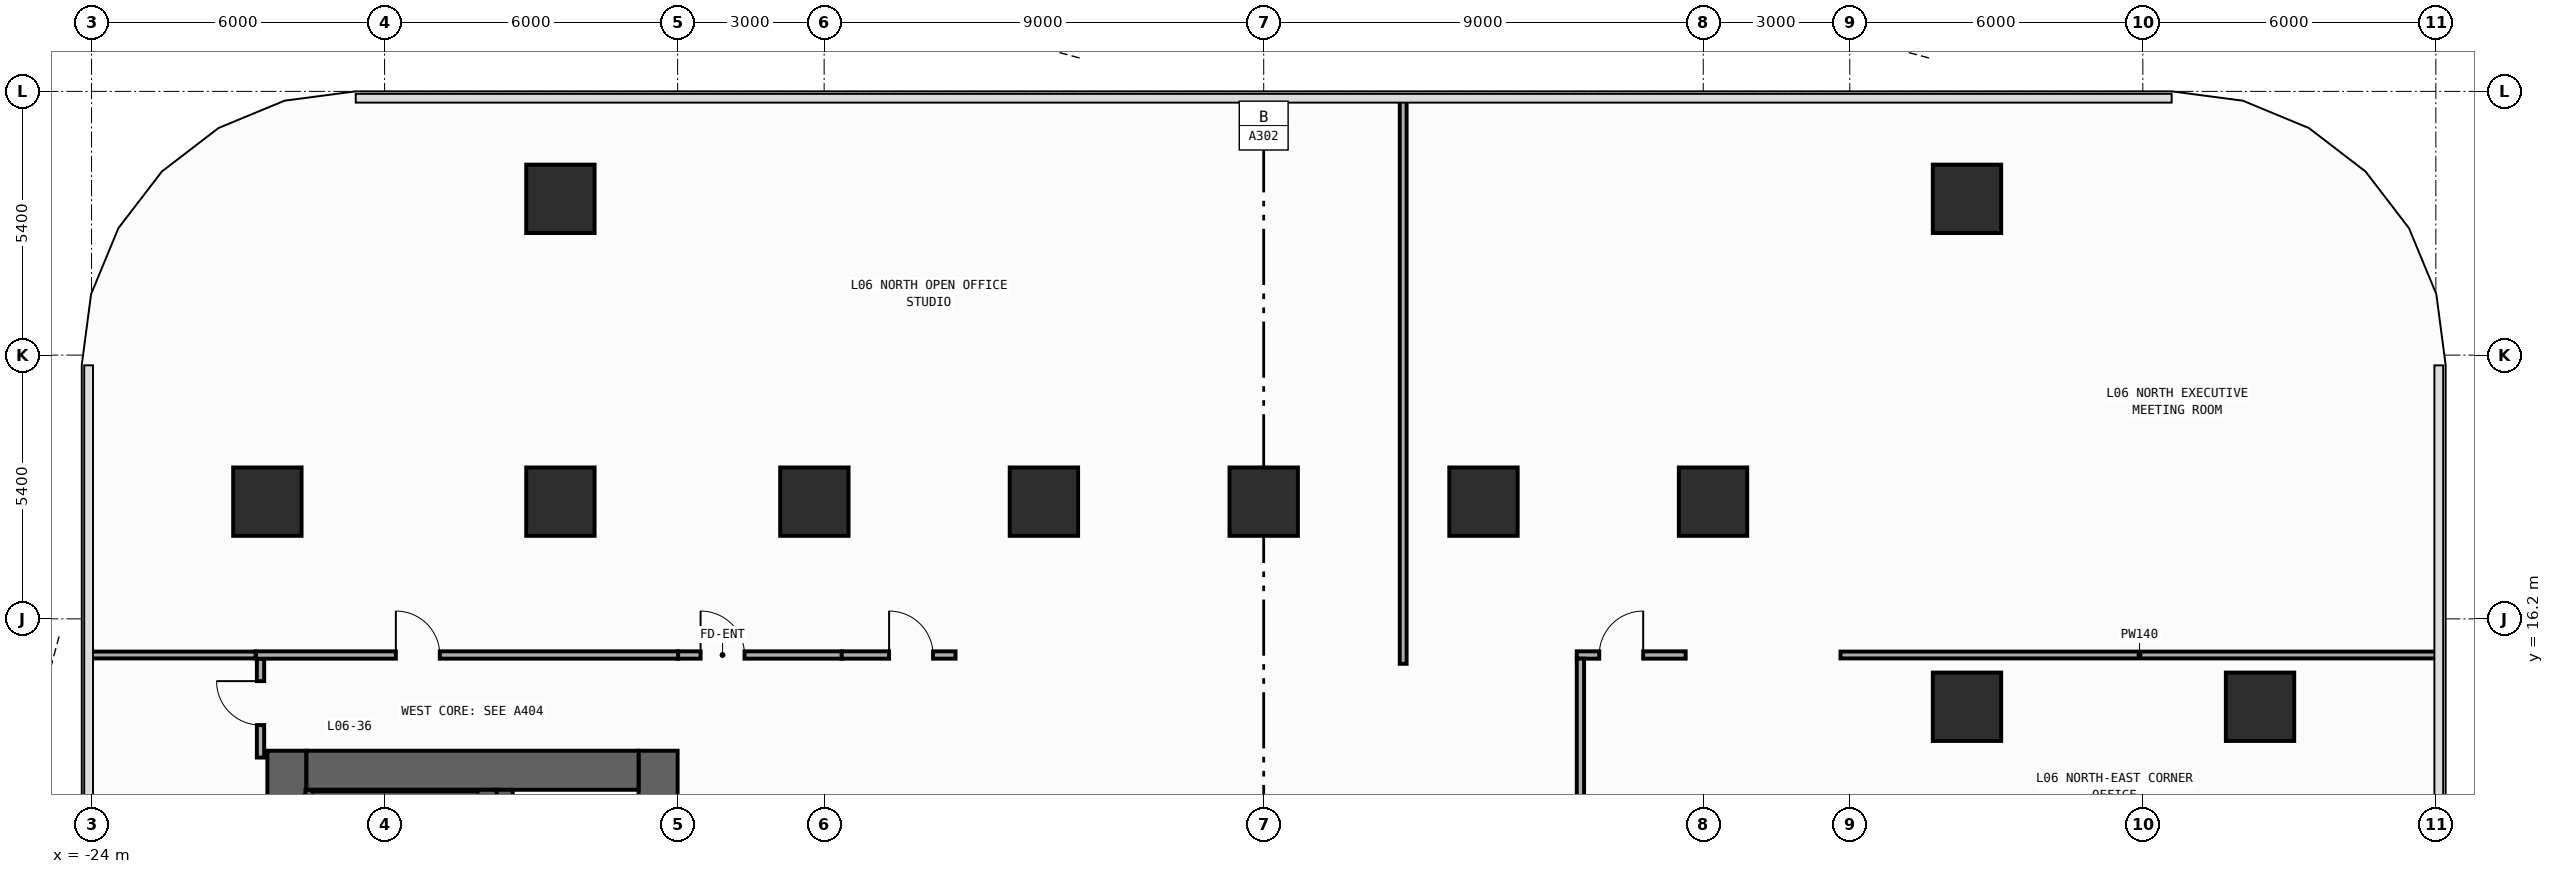
"""IFC4 building model, lengths in metres.
Left out: names, types, materials, properties, quantities, classifications, styles, units other than length and angle.
Written with IfcOpenShell. Run it as: python <this file> out.ifc"""

import sys

from ifc_helpers import new_model, si_unit, direction, frame, frame_2d, origin, origin_2d, place, context, subcontext, project, spatial, rectangle, extrude, element, fill, save


model = new_model("IFC4")
c1 = context("Model", 3, precision=1e-05, world=origin(), true_north=direction((0.0, 1.0)))
c2 = subcontext(c1, "Body", "Model", "MODEL_VIEW")
j1 = project(units=[si_unit("LENGTHUNIT", "METRE"), si_unit("PLANEANGLEUNIT", "RADIAN")], contexts=[c1])
p1 = place(None, origin())
s1 = spatial("IfcSite", under=j1, at=p1, CompositionType="ELEMENT")
p2 = place(p1, origin())
s2 = spatial("IfcBuilding", under=s1, at=p2, CompositionType="ELEMENT")
p3 = place(p2, frame((0.0, 0.0, 26.0)))
s3 = spatial("IfcBuildingStorey", under=s2, at=p3, CompositionType="ELEMENT", Elevation=26.0)
p4 = place(p3, frame((-20.0, -13.5, 0.0), z_axis=(0.0, 0.0, 1.0), x_axis=(0.0, 1.0, 0.0)))
e1 = element("IfcWall", 1, at=p4, inside=s3, PredefinedType="SHEAR", context=c2, shape_type="SweptSolid", body=[
    extrude(rectangle(XDim=27.0, YDim=0.8, at=frame_2d((13.5, 0.0))), origin(), (0.0, 0.0, 1.0), 3.94),
])
p5 = place(p3, frame((-12.4, -13.5, 0.0), z_axis=(0.0, 0.0, 1.0), x_axis=(0.0, 1.0, 0.0)))
e2 = element("IfcWall", 2, at=p5, inside=s3, PredefinedType="SHEAR", context=c2, shape_type="SweptSolid", body=[
    extrude(rectangle(XDim=27.0, YDim=0.8, at=frame_2d((13.5, 0.0))), origin(), (0.0, 0.0, 1.0), 3.94),
])
p6 = place(p5, frame((21.55, 0.0, 0.0)))
e3 = element("IfcOpeningElement", 3, at=p6, cuts=e2, PredefinedType="OPENING", context=c2, shape_type="SweptSolid", body=[
    extrude(rectangle(XDim=1.1, YDim=2.2, at=frame_2d((0.55, 1.1))), frame((0.0, 0.41, 0.0), z_axis=(0.0, -1.0, 0.0), x_axis=(1.0, 0.0, 0.0)), (0.0, 0.0, 1.0), 0.82),
])
p7 = place(p5, frame((18.35, 0.0, 0.0)))
e4 = element("IfcOpeningElement", 4, at=p7, cuts=e2, PredefinedType="OPENING", context=c2, shape_type="SweptSolid", body=[
    extrude(rectangle(XDim=1.1, YDim=2.2, at=frame_2d((0.55, 1.1))), frame((0.0, 0.41, 0.0), z_axis=(0.0, -1.0, 0.0), x_axis=(1.0, 0.0, 0.0)), (0.0, 0.0, 1.0), 0.82),
])
p8 = place(p5, frame((15.15, 0.0, 0.0)))
e5 = element("IfcOpeningElement", 5, at=p8, cuts=e2, PredefinedType="OPENING", context=c2, shape_type="SweptSolid", body=[
    extrude(rectangle(XDim=1.1, YDim=2.2, at=frame_2d((0.55, 1.1))), frame((0.0, 0.41, 0.0), z_axis=(0.0, -1.0, 0.0), x_axis=(1.0, 0.0, 0.0)), (0.0, 0.0, 1.0), 0.82),
])
p9 = place(p5, frame((10.35, 0.0, 0.0)))
e6 = element("IfcOpeningElement", 6, at=p9, cuts=e2, PredefinedType="OPENING", context=c2, shape_type="SweptSolid", body=[
    extrude(rectangle(XDim=1.1, YDim=2.2, at=frame_2d((0.55, 1.1))), frame((0.0, 0.41, 0.0), z_axis=(0.0, -1.0, 0.0), x_axis=(1.0, 0.0, 0.0)), (0.0, 0.0, 1.0), 0.82),
])
p10 = place(p5, frame((7.15, 0.0, 0.0)))
e7 = element("IfcOpeningElement", 7, at=p10, cuts=e2, PredefinedType="OPENING", context=c2, shape_type="SweptSolid", body=[
    extrude(rectangle(XDim=1.1, YDim=2.2, at=frame_2d((0.55, 1.1))), frame((0.0, 0.41, 0.0), z_axis=(0.0, -1.0, 0.0), x_axis=(1.0, 0.0, 0.0)), (0.0, 0.0, 1.0), 0.82),
])
p11 = place(p5, frame((3.95, 0.0, 0.0)))
e8 = element("IfcOpeningElement", 8, at=p11, cuts=e2, PredefinedType="OPENING", context=c2, shape_type="SweptSolid", body=[
    extrude(rectangle(XDim=1.1, YDim=2.2, at=frame_2d((0.55, 1.1))), frame((0.0, 0.41, 0.0), z_axis=(0.0, -1.0, 0.0), x_axis=(1.0, 0.0, 0.0)), (0.0, 0.0, 1.0), 0.82),
])
p12 = place(p5, frame((12.725, 0.0, 0.0)))
e9 = element("IfcOpeningElement", 9, at=p12, cuts=e2, PredefinedType="OPENING", context=c2, shape_type="SweptSolid", body=[
    extrude(rectangle(XDim=1.15, YDim=2.2, at=frame_2d((0.575, 1.1))), frame((0.0, 0.41, 0.0), z_axis=(0.0, -1.0, 0.0), x_axis=(1.0, 0.0, 0.0)), (0.0, 0.0, 1.0), 0.82),
])
p13 = place(p5, frame((1.625, 0.0, 0.0)))
e10 = element("IfcOpeningElement", 10, at=p13, cuts=e2, PredefinedType="OPENING", context=c2, shape_type="SweptSolid", body=[
    extrude(rectangle(XDim=0.85, YDim=2.1, at=frame_2d((0.425, 1.05))), frame((0.0, 0.41, 0.0), z_axis=(0.0, -1.0, 0.0), x_axis=(1.0, 0.0, 0.0)), (0.0, 0.0, 1.0), 0.82),
])
p14 = place(p3, frame((-19.6, 13.1, 0.0), z_axis=(0.0, 0.0, 1.0), x_axis=(1.0, 0.0, 0.0)))
e11 = element("IfcWall", 11, at=p14, inside=s3, PredefinedType="SHEAR", context=c2, shape_type="SweptSolid", body=[
    extrude(rectangle(XDim=6.8, YDim=0.8, at=frame_2d((3.4, 0.0))), origin(), (0.0, 0.0, 1.0), 3.94),
])
p15 = place(p3, frame((-15.55, -12.7, 0.0), z_axis=(0.0, 0.0, 1.0), x_axis=(0.0, 1.0, 0.0)))
e12 = element("IfcWall", 12, at=p15, inside=s3, PredefinedType="SHEAR", context=c2, shape_type="SweptSolid", body=[
    extrude(rectangle(XDim=25.4, YDim=0.35, at=frame_2d((12.7, 0.0))), origin(), (0.0, 0.0, 1.0), 3.94),
])
p16 = place(p15, frame((11.925, 0.0, 0.0)))
e13 = element("IfcOpeningElement", 13, at=p16, cuts=e12, PredefinedType="OPENING", context=c2, shape_type="SweptSolid", body=[
    extrude(rectangle(XDim=1.15, YDim=2.2, at=frame_2d((0.575, 1.1))), frame((0.0, 0.185, 0.0), z_axis=(0.0, -1.0, 0.0), x_axis=(1.0, 0.0, 0.0)), (0.0, 0.0, 1.0), 0.37),
])
p17 = place(p15, frame((0.825, 0.0, 0.0)))
e14 = element("IfcOpeningElement", 14, at=p17, cuts=e12, PredefinedType="OPENING", context=c2, shape_type="SweptSolid", body=[
    extrude(rectangle(XDim=0.85, YDim=2.1, at=frame_2d((0.425, 1.05))), frame((0.0, 0.185, 0.0), z_axis=(0.0, -1.0, 0.0), x_axis=(1.0, 0.0, 0.0)), (0.0, 0.0, 1.0), 0.37),
])
p18 = place(p3, frame((-19.62, 12.59, 0.0), z_axis=(0.0, 0.0, 1.0), x_axis=(1.0, 0.0, 0.0)))
e15 = element("IfcWall", 15, at=p18, inside=s3, PredefinedType="SHEAR", context=c2, shape_type="SweptSolid", body=[
    extrude(rectangle(XDim=3.915, YDim=0.22, at=frame_2d((1.958, 0.0))), origin(), (0.0, 0.0, 1.0), 3.94),
])
for number, where, z_axis, x_axis in (
    (16, (-9.2, 18.6, 0.0), (0.0, 0.0, 1.0), (1.0, 0.0, 0.0)),
    (17, (9.2, 18.6, 0.0), (0.0, 0.0, 1.0), (1.0, 0.0, 0.0)),
    (18, (-20.4, 18.6, 0.0), (0.0, 0.0, 1.0), (1.0, 0.0, 0.0)),
    (19, (20.4, 14.4, 0.0), (0.0, 0.0, 1.0), (1.0, 0.0, 0.0)),
    (20, (-14.4, 18.6, 0.0), (0.0, 0.0, 1.0), (1.0, 0.0, 0.0)),
    (21, (14.4, 14.4, 0.0), (0.0, 0.0, 1.0), (1.0, 0.0, 0.0)),
    (22, (-4.5, 18.6, 0.0), (0.0, 0.0, 1.0), (1.0, 0.0, 0.0)),
    (23, (0.0, 18.6, 0.0), (0.0, 0.0, 1.0), (1.0, 0.0, 0.0)),
    (24, (4.5, 18.6, 0.0), (0.0, 0.0, 1.0), (1.0, 0.0, 0.0)),
    (25, (-14.4, 24.8, 0.0), (0.0, 0.0, 1.0), (1.0, 0.0, 0.0)),
    (26, (14.4, 24.8, 0.0), (0.0, 0.0, 1.0), (1.0, 0.0, 0.0)),
):
    element("IfcColumn", number, at=place(p3, frame(where, z_axis=z_axis, x_axis=x_axis)), inside=s3, PredefinedType="COLUMN", context=c2, shape_type="SweptSolid", body=[
        extrude(rectangle(XDim=1.4, YDim=1.4, at=origin_2d()), origin(), (0.0, 0.0, 1.0), 4.2),
    ])
p19 = place(p3, frame((-11.99, 15.46, 0.0), z_axis=(0.0, 0.0, 1.0), x_axis=(1.0, 0.0, 0.0)))
e27 = element("IfcWall", 27, at=p19, inside=s3, PredefinedType="PARTITIONING", context=c2, shape_type="SweptSolid", body=[
    extrude(rectangle(XDim=3.35, YDim=0.15, at=frame_2d((1.675, 0.0))), origin(), (0.0, 0.0, 1.0), 3.94),
])
p20 = place(p19, frame((0.46, 0.0, 0.0)))
e28 = element("IfcOpeningElement", 28, at=p20, cuts=e27, PredefinedType="OPENING", context=c2, shape_type="SweptSolid", body=[
    extrude(rectangle(XDim=0.9, YDim=2.15, at=frame_2d((0.45, 1.075))), frame((0.0, 0.085, 0.0), z_axis=(0.0, -1.0, 0.0), x_axis=(1.0, 0.0, 0.0)), (0.0, 0.0, 1.0), 0.17),
])
p21 = place(p3, frame((-8.64, 15.46, 0.0), z_axis=(0.0, 0.0, 1.0), x_axis=(1.0, 0.0, 0.0)))
e29 = element("IfcWall", 29, at=p21, inside=s3, PredefinedType="PARTITIONING", context=c2, shape_type="SweptSolid", body=[
    extrude(rectangle(XDim=2.33, YDim=0.15, at=frame_2d((1.165, 0.0))), origin(), (0.0, 0.0, 1.0), 3.94),
])
p22 = place(p21, frame((0.97, 0.0, 0.0)))
e30 = element("IfcOpeningElement", 30, at=p22, cuts=e29, PredefinedType="OPENING", context=c2, shape_type="SweptSolid", body=[
    extrude(rectangle(XDim=0.9, YDim=2.15, at=frame_2d((0.45, 1.075))), frame((0.0, 0.085, 0.0), z_axis=(0.0, -1.0, 0.0), x_axis=(1.0, 0.0, 0.0)), (0.0, 0.0, 1.0), 0.17),
])
p23 = place(p3, frame((6.41, 15.46, 0.0), z_axis=(0.0, 0.0, 1.0), x_axis=(1.0, 0.0, 0.0)))
e31 = element("IfcWall", 31, at=p23, inside=s3, PredefinedType="PARTITIONING", context=c2, shape_type="SweptSolid", body=[
    extrude(rectangle(XDim=2.23, YDim=0.15, at=frame_2d((1.115, 0.0))), origin(), (0.0, 0.0, 1.0), 3.94),
])
p24 = place(p23, frame((0.46, 0.0, 0.0)))
e32 = element("IfcOpeningElement", 32, at=p24, cuts=e31, PredefinedType="OPENING", context=c2, shape_type="SweptSolid", body=[
    extrude(rectangle(XDim=0.9, YDim=2.15, at=frame_2d((0.45, 1.075))), frame((0.0, 0.085, 0.0), z_axis=(0.0, -1.0, 0.0), x_axis=(1.0, 0.0, 0.0)), (0.0, 0.0, 1.0), 0.17),
])
p25 = place(p3, frame((6.485, -3.02, 0.0), z_axis=(0.0, 0.0, 1.0), x_axis=(0.0, 1.0, 0.0)))
e33 = element("IfcWall", 33, at=p25, inside=s3, PredefinedType="PARTITIONING", context=c2, shape_type="SweptSolid", body=[
    extrude(rectangle(XDim=18.405, YDim=0.15, at=frame_2d((9.203, 0.0))), origin(), (0.0, 0.0, 1.0), 3.94),
])
p26 = place(p25, frame((7.944, 0.0, 0.0)))
e34 = element("IfcOpeningElement", 34, at=p26, cuts=e33, PredefinedType="OPENING", context=c2, shape_type="SweptSolid", body=[
    extrude(rectangle(XDim=0.9, YDim=2.15, at=frame_2d((0.45, 1.075))), frame((0.0, 0.085, 0.0), z_axis=(0.0, -1.0, 0.0), x_axis=(1.0, 0.0, 0.0)), (0.0, 0.0, 1.0), 0.17),
])
p27 = place(p3, frame((-20.54, 13.36, 0.0), z_axis=(0.0, 0.0, 1.0), x_axis=(0.0, 1.0, 0.0)))
e35 = element("IfcWall", 35, at=p27, inside=s3, PredefinedType="PARTITIONING", context=c2, shape_type="SweptSolid", body=[
    extrude(rectangle(XDim=2.025, YDim=0.15, at=frame_2d((1.012, 0.0))), origin(), (0.0, 0.0, 1.0), 3.94),
])
p28 = place(p27, frame((0.665, 0.0, 0.0)))
e36 = element("IfcOpeningElement", 36, at=p28, cuts=e35, PredefinedType="OPENING", context=c2, shape_type="SweptSolid", body=[
    extrude(rectangle(XDim=0.9, YDim=2.15, at=frame_2d((0.45, 1.075))), frame((0.0, 0.085, 0.0), z_axis=(0.0, -1.0, 0.0), x_axis=(1.0, 0.0, 0.0)), (0.0, 0.0, 1.0), 0.17),
])
p29 = place(p3, frame((-20.64, 15.46, 0.0), z_axis=(0.0, 0.0, 1.0), x_axis=(1.0, 0.0, 0.0)))
e37 = element("IfcWall", 37, at=p29, inside=s3, PredefinedType="PARTITIONING", context=c2, shape_type="SweptSolid", body=[
    extrude(rectangle(XDim=8.65, YDim=0.15, at=frame_2d((4.325, 0.0))), origin(), (0.0, 0.0, 1.0), 3.94),
])
p30 = place(p29, frame((2.871, 0.0, 0.0)))
e38 = element("IfcOpeningElement", 38, at=p30, cuts=e37, PredefinedType="OPENING", context=c2, shape_type="SweptSolid", body=[
    extrude(rectangle(XDim=0.9, YDim=2.15, at=frame_2d((0.45, 1.075))), frame((0.0, 0.085, 0.0), z_axis=(0.0, -1.0, 0.0), x_axis=(1.0, 0.0, 0.0)), (0.0, 0.0, 1.0), 0.17),
])
p31 = place(p3, frame((-24.055, 15.46, 0.0), z_axis=(0.0, 0.0, 1.0), x_axis=(1.0, 0.0, 0.0)))
e39 = element("IfcWall", 39, at=p31, inside=s3, PredefinedType="PARTITIONING", context=c2, shape_type="SweptSolid", body=[
    extrude(rectangle(XDim=3.415, YDim=0.14, at=frame_2d((1.708, 0.0))), origin(), (0.0, 0.0, 1.0), 3.94),
])
p32 = place(p3, frame((11.81, 15.46, 0.0), z_axis=(0.0, 0.0, 1.0), x_axis=(1.0, 0.0, 0.0)))
e40 = element("IfcWall", 40, at=p32, inside=s3, PredefinedType="PARTITIONING", context=c2, shape_type="SweptSolid", body=[
    extrude(rectangle(XDim=12.245, YDim=0.14, at=frame_2d((6.123, 0.0))), origin(), (0.0, 0.0, 1.0), 3.94),
])
p33 = place(p3, frame((2.856, 15.28, 0.0), z_axis=(0.0, 0.0, 1.0), x_axis=(0.0, 1.0, 0.0)))
e41 = element("IfcWall", 41, at=p33, inside=s3, PredefinedType="PARTITIONING", context=c2, shape_type="SweptSolid", body=[
    extrude(rectangle(XDim=11.575, YDim=0.14, at=frame_2d((5.788, 0.0))), origin(), (0.0, 0.0, 1.0), 3.94),
])
p34 = place(p20, origin())
e42 = element("IfcDoor", 42, at=p34, inside=s3, OperationType="SINGLE_SWING_LEFT", PredefinedType="DOOR", context=c2, shape_type="SweptSolid", body=[
    extrude(rectangle(XDim=0.9, YDim=2.15, at=frame_2d((0.45, 1.075))), frame((0.0, 0.025, 0.0), z_axis=(0.0, -1.0, 0.0), x_axis=(1.0, 0.0, 0.0)), (0.0, 0.0, 1.0), 0.05),
])
fill(e28, e42)
p35 = place(p22, origin())
e43 = element("IfcDoor", 43, at=p35, inside=s3, OperationType="SINGLE_SWING_LEFT", PredefinedType="DOOR", context=c2, shape_type="SweptSolid", body=[
    extrude(rectangle(XDim=0.9, YDim=2.15, at=frame_2d((0.45, 1.075))), frame((0.0, 0.025, 0.0), z_axis=(0.0, -1.0, 0.0), x_axis=(1.0, 0.0, 0.0)), (0.0, 0.0, 1.0), 0.05),
])
fill(e30, e43)
p36 = place(p24, origin())
e44 = element("IfcDoor", 44, at=p36, inside=s3, OperationType="SINGLE_SWING_RIGHT", PredefinedType="DOOR", context=c2, shape_type="SweptSolid", body=[
    extrude(rectangle(XDim=0.9, YDim=2.15, at=frame_2d((0.45, 1.075))), frame((0.0, 0.025, 0.0), z_axis=(0.0, -1.0, 0.0), x_axis=(1.0, 0.0, 0.0)), (0.0, 0.0, 1.0), 0.05),
])
fill(e32, e44)
p37 = place(p28, origin())
e45 = element("IfcDoor", 45, at=p37, inside=s3, OperationType="SINGLE_SWING_RIGHT", PredefinedType="DOOR", context=c2, shape_type="SweptSolid", body=[
    extrude(rectangle(XDim=0.9, YDim=2.15, at=frame_2d((0.45, 1.075))), frame((0.0, 0.025, 0.0), z_axis=(0.0, -1.0, 0.0), x_axis=(1.0, 0.0, 0.0)), (0.0, 0.0, 1.0), 0.05),
])
fill(e36, e45)
p38 = place(p30, origin())
e46 = element("IfcDoor", 46, at=p38, inside=s3, OperationType="SINGLE_SWING_LEFT", PredefinedType="DOOR", context=c2, shape_type="SweptSolid", body=[
    extrude(rectangle(XDim=0.9, YDim=2.15, at=frame_2d((0.45, 1.075))), frame((0.0, 0.025, 0.0), z_axis=(0.0, -1.0, 0.0), x_axis=(1.0, 0.0, 0.0)), (0.0, 0.0, 1.0), 0.05),
])
fill(e38, e46)
save(model, sys.argv[1])
